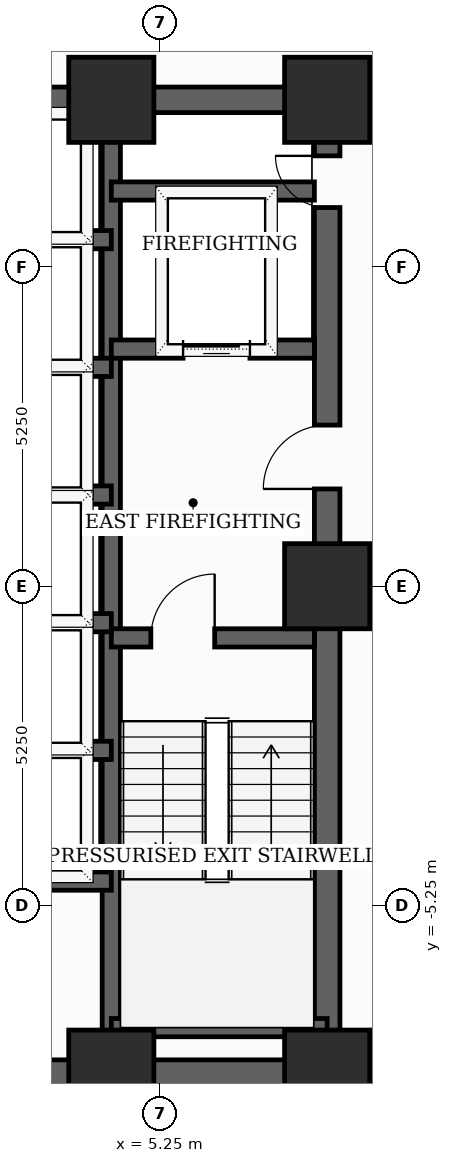
"""IFC4 building model, lengths in metres.
Left out: names, types, materials, properties, quantities, classifications, styles, units other than length and angle.
Written with IfcOpenShell. Run it as: python <this file> out.ifc"""

import sys

from ifc_helpers import new_model, si_unit, direction, frame, frame_2d, origin, origin_2d, place, context, subcontext, project, spatial, rectangle, extrude, element, fill, save


model = new_model("IFC4")
c1 = context("Model", 3, precision=1e-05, world=origin(), true_north=direction((0.0, 1.0)))
c2 = subcontext(c1, "Body", "Model", "MODEL_VIEW")
j1 = project(units=[si_unit("LENGTHUNIT", "METRE"), si_unit("PLANEANGLEUNIT", "RADIAN")], contexts=[c1])
p1 = place(None, origin())
s1 = spatial("IfcSite", under=j1, at=p1, CompositionType="ELEMENT")
p2 = place(p1, origin())
s2 = spatial("IfcBuilding", under=s1, at=p2, CompositionType="ELEMENT")
p3 = place(p2, frame((0.0, 0.0, 90.3)))
s3 = spatial("IfcBuildingStorey", under=s2, at=p3, CompositionType="ELEMENT", Elevation=90.3)
for number, where, z_axis, x_axis in (
    (1, (4.45, -8.0, 0.0), (0.0, 0.0, 1.0), (1.0, 0.0, 0.0)),
    (2, (8.0, -8.0, 0.0), (0.0, 0.0, 1.0), (1.0, 0.0, 0.0)),
    (3, (8.0, 0.0, 0.0), (0.0, 0.0, 1.0), (1.0, 0.0, 0.0)),
    (4, (8.0, 8.0, 0.0), (0.0, 0.0, 1.0), (1.0, 0.0, 0.0)),
    (5, (4.45, 8.0, 0.0), (0.0, 0.0, 1.0), (1.0, 0.0, 0.0)),
):
    element("IfcColumn", number, at=place(p3, frame(where, z_axis=z_axis, x_axis=x_axis)), inside=s3, PredefinedType="COLUMN", context=c2, shape_type="SweptSolid", body=[
        extrude(rectangle(XDim=1.4, YDim=1.4, at=origin_2d()), origin(), (0.0, 0.0, 1.0), 3.7),
    ])
p4 = place(p3, frame((8.0, -8.0, 0.0), z_axis=(0.0, 0.0, 1.0), x_axis=(0.0, 1.0, 0.0)))
e6 = element("IfcWall", 6, at=p4, inside=s3, PredefinedType="SHEAR", context=c2, shape_type="SweptSolid", body=[
    extrude(rectangle(XDim=16.0, YDim=0.42, at=frame_2d((8.0, 0.0))), origin(), (0.0, 0.0, 1.0), 3.5),
])
p5 = place(p4, frame((9.6, 0.0, 0.0)))
e7 = element("IfcOpeningElement", 7, at=p5, cuts=e6, PredefinedType="OPENING", context=c2, shape_type="SweptSolid", body=[
    extrude(rectangle(XDim=1.05, YDim=2.15, at=frame_2d((0.525, 1.075))), frame((0.0, 0.22, 0.0), z_axis=(0.0, -1.0, 0.0), x_axis=(1.0, 0.0, 0.0)), (0.0, 0.0, 1.0), 0.44),
])
p6 = place(p4, frame((14.229, 0.0, 0.0)))
e8 = element("IfcOpeningElement", 8, at=p6, cuts=e6, PredefinedType="OPENING", context=c2, shape_type="SweptSolid", body=[
    extrude(rectangle(XDim=0.85, YDim=2.02, at=frame_2d((0.425, 1.01))), frame((0.0, 0.22, 0.0), z_axis=(0.0, -1.0, 0.0), x_axis=(1.0, 0.0, 0.0)), (0.0, 0.0, 1.0), 0.44),
])
p7 = place(p3, frame((-8.0, -8.0, 0.0), z_axis=(0.0, 0.0, 1.0), x_axis=(1.0, 0.0, 0.0)))
e9 = element("IfcWall", 9, at=p7, inside=s3, PredefinedType="SHEAR", context=c2, shape_type="SweptSolid", body=[
    extrude(rectangle(XDim=16.0, YDim=0.42, at=frame_2d((8.0, 0.0))), origin(), (0.0, 0.0, 1.0), 3.5),
])
p8 = place(p7, frame((7.52, 0.0, 0.0)))
e10 = element("IfcOpeningElement", 10, at=p8, cuts=e9, PredefinedType="OPENING", context=c2, shape_type="SweptSolid", body=[
    extrude(rectangle(XDim=0.95, YDim=2.1, at=frame_2d((0.475, 1.05))), frame((0.0, 0.22, 0.0), z_axis=(0.0, -1.0, 0.0), x_axis=(1.0, 0.0, 0.0)), (0.0, 0.0, 1.0), 0.44),
])
p9 = place(p3, frame((-8.0, 8.0, 0.0), z_axis=(0.0, 0.0, 1.0), x_axis=(1.0, 0.0, 0.0)))
e11 = element("IfcWall", 11, at=p9, inside=s3, PredefinedType="SHEAR", context=c2, shape_type="SweptSolid", body=[
    extrude(rectangle(XDim=16.0, YDim=0.42, at=frame_2d((8.0, 0.0))), origin(), (0.0, 0.0, 1.0), 3.5),
])
p10 = place(p9, frame((7.1, 0.0, 0.0)))
e12 = element("IfcOpeningElement", 12, at=p10, cuts=e11, PredefinedType="OPENING", context=c2, shape_type="SweptSolid", body=[
    extrude(rectangle(XDim=1.8, YDim=2.15, at=frame_2d((0.9, 1.075))), frame((0.0, 0.22, 0.0), z_axis=(0.0, -1.0, 0.0), x_axis=(1.0, 0.0, 0.0)), (0.0, 0.0, 1.0), 0.44),
])
p11 = place(p3, frame((4.45, -7.79, 0.0), z_axis=(0.0, 0.0, 1.0), x_axis=(0.0, 1.0, 0.0)))
e13 = element("IfcWall", 13, at=p11, inside=s3, PredefinedType="SHEAR", context=c2, shape_type="SweptSolid", body=[
    extrude(rectangle(XDim=15.58, YDim=0.3, at=frame_2d((7.79, 0.0))), origin(), (0.0, 0.0, 1.0), 3.5),
])
p12 = place(p3, frame((4.45, -0.85, 0.0), z_axis=(0.0, 0.0, 1.0), x_axis=(1.0, 0.0, 0.0)))
e14 = element("IfcWall", 14, at=p12, inside=s3, PredefinedType="SHEAR", context=c2, shape_type="SweptSolid", body=[
    extrude(rectangle(XDim=3.34, YDim=0.3, at=frame_2d((1.67, 0.0))), origin(), (0.0, 0.0, 1.0), 3.5),
])
p13 = place(p12, frame((0.65, 0.0, 0.0)))
e15 = element("IfcOpeningElement", 15, at=p13, cuts=e14, PredefinedType="OPENING", context=c2, shape_type="SweptSolid", body=[
    extrude(rectangle(XDim=1.05, YDim=2.15, at=frame_2d((0.525, 1.075))), frame((0.0, 0.16, 0.0), z_axis=(0.0, -1.0, 0.0), x_axis=(1.0, 0.0, 0.0)), (0.0, 0.0, 1.0), 0.32),
])
p14 = place(p3, frame((4.45, -7.26, 0.0), z_axis=(0.0, 0.0, 1.0), x_axis=(1.0, 0.0, 0.0)))
e16 = element("IfcWall", 16, at=p14, inside=s3, PredefinedType="SHEAR", context=c2, shape_type="SweptSolid", body=[
    extrude(rectangle(XDim=3.55, YDim=0.3, at=frame_2d((1.775, 0.0))), origin(), (0.0, 0.0, 1.0), 3.5),
])
p15 = place(p3, frame((4.45, 3.9, 0.0), z_axis=(0.0, 0.0, 1.0), x_axis=(1.0, 0.0, 0.0)))
e17 = element("IfcWall", 17, at=p15, inside=s3, PredefinedType="SHEAR", context=c2, shape_type="SweptSolid", body=[
    extrude(rectangle(XDim=3.34, YDim=0.3, at=frame_2d((1.67, 0.0))), origin(), (0.0, 0.0, 1.0), 3.5),
])
p16 = place(p15, frame((1.18, 0.0, 0.0)))
e18 = element("IfcOpeningElement", 18, at=p16, cuts=e17, PredefinedType="OPENING", context=c2, shape_type="SweptSolid", body=[
    extrude(rectangle(XDim=1.1, YDim=2.1, at=frame_2d((0.55, 1.05))), frame((0.0, 0.16, 0.0), z_axis=(0.0, -1.0, 0.0), x_axis=(1.0, 0.0, 0.0)), (0.0, 0.0, 1.0), 0.32),
])
p17 = place(p3, frame((4.45, 6.5, 0.0), z_axis=(0.0, 0.0, 1.0), x_axis=(1.0, 0.0, 0.0)))
e19 = element("IfcWall", 19, at=p17, inside=s3, PredefinedType="SHEAR", context=c2, shape_type="SweptSolid", body=[
    extrude(rectangle(XDim=3.34, YDim=0.3, at=frame_2d((1.67, 0.0))), origin(), (0.0, 0.0, 1.0), 3.5),
])
p18 = place(p3, frame((-4.45, -4.85, 0.0), z_axis=(0.0, 0.0, 1.0), x_axis=(1.0, 0.0, 0.0)))
e20 = element("IfcWall", 20, at=p18, inside=s3, PredefinedType="SHEAR", context=c2, shape_type="SweptSolid", body=[
    extrude(rectangle(XDim=8.9, YDim=0.3, at=frame_2d((4.45, 0.0))), origin(), (0.0, 0.0, 1.0), 3.5),
])
for number, where, z_axis, x_axis in (
    (21, (1.68, 1.5, 0.0), (0.0, 0.0, 1.0), (1.0, 0.0, 0.0)),
    (22, (1.68, 3.6, 0.0), (0.0, 0.0, 1.0), (1.0, 0.0, 0.0)),
    (23, (1.68, 5.7, 0.0), (0.0, 0.0, 1.0), (1.0, 0.0, 0.0)),
    (24, (1.68, -2.7, 0.0), (0.0, 0.0, 1.0), (1.0, 0.0, 0.0)),
    (25, (1.68, -0.6, 0.0), (0.0, 0.0, 1.0), (1.0, 0.0, 0.0)),
):
    element("IfcWall", number, at=place(p3, frame(where, z_axis=z_axis, x_axis=x_axis)), inside=s3, PredefinedType="SHEAR", context=c2, shape_type="SweptSolid", body=[
        extrude(rectangle(XDim=2.77, YDim=0.3, at=frame_2d((1.385, 0.0))), origin(), (0.0, 0.0, 1.0), 3.5),
    ])
p19 = place(p5, origin())
e26 = element("IfcDoor", 26, at=p19, inside=s3, OperationType="SINGLE_SWING_LEFT", PredefinedType="DOOR", context=c2, shape_type="SweptSolid", body=[
    extrude(rectangle(XDim=1.05, YDim=2.15, at=frame_2d((0.525, 1.075))), frame((0.0, 0.025, 0.0), z_axis=(0.0, -1.0, 0.0), x_axis=(1.0, 0.0, 0.0)), (0.0, 0.0, 1.0), 0.05),
])
fill(e7, e26)
p20 = place(p6, origin())
e27 = element("IfcDoor", 27, at=p20, inside=s3, OperationType="SINGLE_SWING_RIGHT", PredefinedType="TRAPDOOR", context=c2, shape_type="SweptSolid", body=[
    extrude(rectangle(XDim=0.85, YDim=2.02, at=frame_2d((0.425, 1.01))), frame((0.0, 0.025, 0.0), z_axis=(0.0, -1.0, 0.0), x_axis=(1.0, 0.0, 0.0)), (0.0, 0.0, 1.0), 0.05),
])
fill(e8, e27)
p21 = place(p13, origin())
e28 = element("IfcDoor", 28, at=p21, inside=s3, OperationType="SINGLE_SWING_RIGHT", PredefinedType="DOOR", context=c2, shape_type="SweptSolid", body=[
    extrude(rectangle(XDim=1.05, YDim=2.15, at=frame_2d((0.525, 1.075))), frame((0.0, 0.025, 0.0), z_axis=(0.0, -1.0, 0.0), x_axis=(1.0, 0.0, 0.0)), (0.0, 0.0, 1.0), 0.05),
])
fill(e15, e28)
p22 = place(p16, origin())
e29 = element("IfcDoor", 29, at=p22, inside=s3, OperationType="SLIDING_TO_LEFT", PredefinedType="DOOR", context=c2, shape_type="SweptSolid", body=[
    extrude(rectangle(XDim=1.1, YDim=2.1, at=frame_2d((0.55, 1.05))), frame((0.0, 0.025, 0.0), z_axis=(0.0, -1.0, 0.0), x_axis=(1.0, 0.0, 0.0)), (0.0, 0.0, 1.0), 0.05),
])
fill(e18, e29)
save(model, sys.argv[1])
